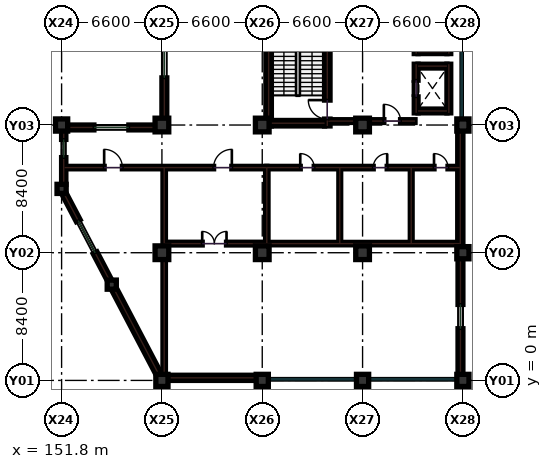
"""IFC4 building model, lengths in metres.
Left out: names, types, materials, properties, quantities, classifications, styles, units other than length and angle.
Written with IfcOpenShell. Run it as: python <this file> out.ifc"""

import sys

from ifc_helpers import new_model, si_unit, direction, frame, frame_2d, origin, origin_2d, place, context, subcontext, project, spatial, rectangle, extrude, element, fill, save


model = new_model("IFC4")
c1 = context("Model", 3, precision=1e-05, world=origin(), true_north=direction((0.0, 1.0)))
c2 = subcontext(c1, "Body", "Model", "MODEL_VIEW")
j1 = project(units=[si_unit("LENGTHUNIT", "METRE"), si_unit("PLANEANGLEUNIT", "RADIAN")], contexts=[c1])
p1 = place(None, origin())
s1 = spatial("IfcSite", under=j1, at=p1, CompositionType="ELEMENT")
p2 = place(p1, origin())
s2 = spatial("IfcBuilding", under=s1, at=p2, CompositionType="ELEMENT")
p3 = place(p2, frame((0.0, 0.0, 9.9)))
s3 = spatial("IfcBuildingStorey", under=s2, at=p3, CompositionType="ELEMENT", Elevation=9.9)
for number, where, z_axis, x_axis in (
    (1, (151.8, 16.8, 0.0), (0.0, 0.0, 1.0), (1.0, 0.0, 0.0)),
    (2, (158.4, 0.0, 0.0), (0.0, 0.0, 1.0), (1.0, 0.0, 0.0)),
):
    element("IfcColumn", number, at=place(p3, frame(where, z_axis=z_axis, x_axis=x_axis)), inside=s3, PredefinedType="COLUMN", context=c2, shape_type="SweptSolid", body=[
        extrude(rectangle(XDim=0.8, YDim=0.8, at=origin_2d()), origin(), (0.0, 0.0, 1.0), 4.5),
    ])
for number, where, z_axis, x_axis in (
    (3, (158.4, 8.4, 0.0), (0.0, 0.0, 1.0), (1.0, 0.0, 0.0)),
    (4, (158.4, 16.8, 0.0), (0.0, 0.0, 1.0), (1.0, 0.0, 0.0)),
):
    element("IfcColumn", number, at=place(p3, frame(where, z_axis=z_axis, x_axis=x_axis)), inside=s3, PredefinedType="COLUMN", context=c2, shape_type="SweptSolid", body=[
        extrude(rectangle(XDim=0.9, YDim=0.9, at=origin_2d()), origin(), (0.0, 0.0, 1.0), 4.5),
    ])
p4 = place(p3, frame((165.0, 0.0, 0.0), z_axis=(0.0, 0.0, 1.0), x_axis=(1.0, 0.0, 0.0)))
e5 = element("IfcColumn", 5, at=p4, inside=s3, PredefinedType="COLUMN", context=c2, shape_type="SweptSolid", body=[
    extrude(rectangle(XDim=0.8, YDim=0.8, at=origin_2d()), origin(), (0.0, 0.0, 1.0), 4.5),
])
for number, where, z_axis, x_axis in (
    (6, (165.0, 8.4, 0.0), (0.0, 0.0, 1.0), (1.0, 0.0, 0.0)),
    (7, (165.0, 16.8, 0.0), (0.0, 0.0, 1.0), (1.0, 0.0, 0.0)),
):
    element("IfcColumn", number, at=place(p3, frame(where, z_axis=z_axis, x_axis=x_axis)), inside=s3, PredefinedType="COLUMN", context=c2, shape_type="SweptSolid", body=[
        extrude(rectangle(XDim=0.9, YDim=0.9, at=origin_2d()), origin(), (0.0, 0.0, 1.0), 4.5),
    ])
p5 = place(p3, frame((171.6, 0.0, 0.0), z_axis=(0.0, 0.0, 1.0), x_axis=(1.0, 0.0, 0.0)))
e8 = element("IfcColumn", 8, at=p5, inside=s3, PredefinedType="COLUMN", context=c2, shape_type="SweptSolid", body=[
    extrude(rectangle(XDim=0.8, YDim=0.8, at=origin_2d()), origin(), (0.0, 0.0, 1.0), 4.5),
])
for number, where, z_axis, x_axis in (
    (9, (171.6, 8.4, 0.0), (0.0, 0.0, 1.0), (1.0, 0.0, 0.0)),
    (10, (171.6, 16.8, 0.0), (0.0, 0.0, 1.0), (1.0, 0.0, 0.0)),
):
    element("IfcColumn", number, at=place(p3, frame(where, z_axis=z_axis, x_axis=x_axis)), inside=s3, PredefinedType="COLUMN", context=c2, shape_type="SweptSolid", body=[
        extrude(rectangle(XDim=0.9, YDim=0.9, at=origin_2d()), origin(), (0.0, 0.0, 1.0), 4.5),
    ])
for number, where, z_axis, x_axis in (
    (11, (178.2, 0.0, 0.0), (0.0, 0.0, 1.0), (1.0, 0.0, 0.0)),
    (12, (178.2, 8.4, 0.0), (0.0, 0.0, 1.0), (1.0, 0.0, 0.0)),
    (13, (178.2, 16.8, 0.0), (0.0, 0.0, 1.0), (1.0, 0.0, 0.0)),
):
    element("IfcColumn", number, at=place(p3, frame(where, z_axis=z_axis, x_axis=x_axis)), inside=s3, PredefinedType="COLUMN", context=c2, shape_type="SweptSolid", body=[
        extrude(rectangle(XDim=0.8, YDim=0.8, at=origin_2d()), origin(), (0.0, 0.0, 1.0), 4.5),
    ])
for number, where, z_axis, x_axis in (
    (14, (151.8, 12.6, 0.0), (0.0, 0.0, 1.0), (1.0, 0.0, 0.0)),
    (15, (155.1, 6.3, 0.0), (0.0, 0.0, 1.0), (1.0, 0.0, 0.0)),
):
    element("IfcColumn", number, at=place(p3, frame(where, z_axis=z_axis, x_axis=x_axis)), inside=s3, PredefinedType="COLUMN", context=c2, shape_type="SweptSolid", body=[
        extrude(rectangle(XDim=0.6, YDim=0.6, at=origin_2d()), origin(), (0.0, 0.0, 1.0), 4.5),
    ])
p6 = place(p3, frame((165.3, 14.0, 0.0), z_axis=(0.0, 0.0, 1.0), x_axis=(1.0, 0.0, 0.0)))
e16 = element("IfcWall", 16, at=p6, inside=s3, PredefinedType="PARTITIONING", context=c2, shape_type="SweptSolid", body=[
    extrude(rectangle(XDim=12.7, YDim=0.16, at=frame_2d((6.35, 0.0))), origin(), (0.0, 0.0, 1.0), 3.49),
])
p7 = place(p6, frame((2.2, 0.0, 0.0)))
e17 = element("IfcOpeningElement", 17, at=p7, cuts=e16, PredefinedType="OPENING", context=c2, shape_type="SweptSolid", body=[
    extrude(rectangle(XDim=0.92, YDim=2.08, at=frame_2d((0.46, 1.04))), frame((0.0, 0.09, 0.0), z_axis=(0.0, -1.0, 0.0), x_axis=(1.0, 0.0, 0.0)), (0.0, 0.0, 1.0), 0.18),
])
p8 = place(p6, frame((7.0, 0.0, 0.0)))
e18 = element("IfcOpeningElement", 18, at=p8, cuts=e16, PredefinedType="OPENING", context=c2, shape_type="SweptSolid", body=[
    extrude(rectangle(XDim=0.92, YDim=2.08, at=frame_2d((0.46, 1.04))), frame((0.0, 0.09, 0.0), z_axis=(0.0, -1.0, 0.0), x_axis=(1.0, 0.0, 0.0)), (0.0, 0.0, 1.0), 0.18),
])
p9 = place(p6, frame((11.0, 0.0, 0.0)))
e19 = element("IfcOpeningElement", 19, at=p9, cuts=e16, PredefinedType="OPENING", context=c2, shape_type="SweptSolid", body=[
    extrude(rectangle(XDim=0.92, YDim=2.08, at=frame_2d((0.46, 1.04))), frame((0.0, 0.09, 0.0), z_axis=(0.0, -1.0, 0.0), x_axis=(1.0, 0.0, 0.0)), (0.0, 0.0, 1.0), 0.18),
])
p10 = place(p3, frame((165.3, 9.0, 0.0), z_axis=(0.0, 0.0, 1.0), x_axis=(1.0, 0.0, 0.0)))
e20 = element("IfcWall", 20, at=p10, inside=s3, PredefinedType="PARTITIONING", context=c2, shape_type="SweptSolid", body=[
    extrude(rectangle(XDim=12.7, YDim=0.16, at=frame_2d((6.35, 0.0))), origin(), (0.0, 0.0, 1.0), 3.49),
])
p11 = place(p3, frame((165.3, 9.0, 0.0), z_axis=(0.0, 0.0, 1.0), x_axis=(0.0, 1.0, 0.0)))
e21 = element("IfcWall", 21, at=p11, inside=s3, PredefinedType="PARTITIONING", context=c2, shape_type="SweptSolid", body=[
    extrude(rectangle(XDim=5.0, YDim=0.16, at=frame_2d((2.5, 0.0))), origin(), (0.0, 0.0, 1.0), 3.49),
])
for number, where, z_axis, x_axis in (
    (22, (170.1, 9.0, 0.0), (0.0, 0.0, 1.0), (0.0, 1.0, 0.0)),
    (23, (174.8, 9.0, 0.0), (0.0, 0.0, 1.0), (0.0, 1.0, 0.0)),
):
    element("IfcWall", number, at=place(p3, frame(where, z_axis=z_axis, x_axis=x_axis)), inside=s3, PredefinedType="PARTITIONING", context=c2, shape_type="SweptSolid", body=[
        extrude(rectangle(XDim=5.0, YDim=0.12, at=frame_2d((2.5, 0.0))), origin(), (0.0, 0.0, 1.0), 3.49),
    ])
p12 = place(p3, frame((158.55, 9.0, 0.0), z_axis=(0.0, 0.0, 1.0), x_axis=(1.0, 0.0, 0.0)))
e24 = element("IfcWall", 24, at=p12, inside=s3, PredefinedType="SOLIDWALL", context=c2, shape_type="SweptSolid", body=[
    extrude(rectangle(XDim=6.75, YDim=0.18, at=frame_2d((3.375, 0.0))), origin(), (0.0, 0.0, 1.0), 3.49),
])
p13 = place(p12, frame((2.5, 0.0, 0.0)))
e25 = element("IfcOpeningElement", 25, at=p13, cuts=e24, PredefinedType="OPENING", context=c2, shape_type="SweptSolid", body=[
    extrude(rectangle(XDim=1.6, YDim=2.2, at=frame_2d((0.8, 1.1))), frame((0.0, 0.1, 0.0), z_axis=(0.0, -1.0, 0.0), x_axis=(1.0, 0.0, 0.0)), (0.0, 0.0, 1.0), 0.2),
])
p14 = place(p3, frame((158.55, 0.25, 0.0), z_axis=(0.0, 0.0, 1.0), x_axis=(0.0, 1.0, 0.0)))
e26 = element("IfcWall", 26, at=p14, inside=s3, PredefinedType="PARTITIONING", context=c2, shape_type="SweptSolid", body=[
    extrude(rectangle(XDim=7.7, YDim=0.16, at=frame_2d((3.85, 0.0))), origin(), (0.0, 0.0, 1.0), 3.49),
])
p15 = place(p3, frame((158.55, 8.85, 0.0), z_axis=(0.0, 0.0, 1.0), x_axis=(0.0, 1.0, 0.0)))
e27 = element("IfcWall", 27, at=p15, inside=s3, PredefinedType="PARTITIONING", context=c2, shape_type="SweptSolid", body=[
    extrude(rectangle(XDim=5.15, YDim=0.16, at=frame_2d((2.575, 0.0))), origin(), (0.0, 0.0, 1.0), 3.49),
])
p16 = place(p3, frame((152.0, 14.0, 0.0), z_axis=(0.0, 0.0, 1.0), x_axis=(1.0, 0.0, 0.0)))
e28 = element("IfcWall", 28, at=p16, inside=s3, PredefinedType="PARTITIONING", context=c2, shape_type="SweptSolid", body=[
    extrude(rectangle(XDim=13.3, YDim=0.16, at=frame_2d((6.65, 0.0))), origin(), (0.0, 0.0, 1.0), 3.49),
])
p17 = place(p16, frame((2.6, 0.0, 0.0)))
e29 = element("IfcOpeningElement", 29, at=p17, cuts=e28, PredefinedType="OPENING", context=c2, shape_type="SweptSolid", body=[
    extrude(rectangle(XDim=1.2, YDim=2.22, at=frame_2d((0.6, 1.11))), frame((0.0, 0.09, 0.0), z_axis=(0.0, -1.0, 0.0), x_axis=(1.0, 0.0, 0.0)), (0.0, 0.0, 1.0), 0.18),
])
p18 = place(p16, frame((9.8, 0.0, 0.0)))
e30 = element("IfcOpeningElement", 30, at=p18, cuts=e28, PredefinedType="OPENING", context=c2, shape_type="SweptSolid", body=[
    extrude(rectangle(XDim=1.2, YDim=2.22, at=frame_2d((0.6, 1.11))), frame((0.0, 0.09, 0.0), z_axis=(0.0, -1.0, 0.0), x_axis=(1.0, 0.0, 0.0)), (0.0, 0.0, 1.0), 0.18),
])
p19 = place(p3, frame((157.955, 16.64, 0.0), z_axis=(0.0, 0.0, 1.0), x_axis=(-1.0, 0.0, 0.0)))
e31 = element("IfcWall", 31, at=p19, inside=s3, PredefinedType="SOLIDWALL", context=c2, shape_type="SweptSolid", body=[
    extrude(rectangle(XDim=5.76, YDim=0.32, at=frame_2d((2.88, 0.0))), origin(), (0.0, 0.0, 1.0), 3.625),
])
p20 = place(p19, frame((1.73, 0.0, 0.95)))
e32 = element("IfcOpeningElement", 32, at=p20, cuts=e31, PredefinedType="OPENING", context=c2, shape_type="SweptSolid", body=[
    extrude(rectangle(XDim=2.3, YDim=1.95, at=frame_2d((1.15, 0.975))), frame((0.0, 0.17, 0.0), z_axis=(0.0, -1.0, 0.0), x_axis=(1.0, 0.0, 0.0)), (0.0, 0.0, 1.0), 0.34),
])
p21 = place(p3, frame((158.795, 0.17, 0.0), z_axis=(0.0, 0.0, 1.0), x_axis=(1.0, 0.0, 0.0)))
e33 = element("IfcWall", 33, at=p21, inside=s3, PredefinedType="SHEAR", context=c2, shape_type="SweptSolid", body=[
    extrude(rectangle(XDim=5.81, YDim=0.34, at=frame_2d((2.905, 0.0))), origin(), (0.0, 0.0, 1.0), 4.24),
])
p22 = place(p3, frame((158.56, 24.755, 0.0), z_axis=(0.0, 0.0, 1.0), x_axis=(0.0, -1.0, 0.0)))
e34 = element("IfcWall", 34, at=p22, inside=s3, PredefinedType="SOLIDWALL", context=c2, shape_type="SweptSolid", body=[
    extrude(rectangle(XDim=7.51, YDim=0.32, at=frame_2d((3.755, 0.0))), origin(), (0.0, 0.0, 1.0), 3.625),
])
p23 = place(p22, frame((2.655, 0.0, 0.95)))
e35 = element("IfcOpeningElement", 35, at=p23, cuts=e34, PredefinedType="OPENING", context=c2, shape_type="SweptSolid", body=[
    extrude(rectangle(XDim=2.2, YDim=1.85, at=frame_2d((1.1, 0.925))), frame((0.0, 0.17, 0.0), z_axis=(0.0, -1.0, 0.0), x_axis=(1.0, 0.0, 0.0)), (0.0, 0.0, 1.0), 0.34),
])
p24 = place(p3, frame((178.04, 0.395, 0.0), z_axis=(0.0, 0.0, 1.0), x_axis=(0.0, 1.0, 0.0)))
e36 = element("IfcWall", 36, at=p24, inside=s3, PredefinedType="SOLIDWALL", context=c2, shape_type="SweptSolid", body=[
    extrude(rectangle(XDim=7.61, YDim=0.32, at=frame_2d((3.805, 0.0))), origin(), (0.0, 0.0, 1.0), 3.625),
])
p25 = place(p24, frame((3.005, 0.0, 0.95)))
e37 = element("IfcOpeningElement", 37, at=p25, cuts=e36, PredefinedType="OPENING", context=c2, shape_type="SweptSolid", body=[
    extrude(rectangle(XDim=1.6, YDim=1.85, at=frame_2d((0.8, 0.925))), frame((0.0, 0.17, 0.0), z_axis=(0.0, -1.0, 0.0), x_axis=(1.0, 0.0, 0.0)), (0.0, 0.0, 1.0), 0.34),
])
p26 = place(p3, frame((178.03, 8.795, 0.0), z_axis=(0.0, 0.0, 1.0), x_axis=(0.0, 1.0, 0.0)))
e38 = element("IfcWall", 38, at=p26, inside=s3, PredefinedType="SHEAR", context=c2, shape_type="SweptSolid", body=[
    extrude(rectangle(XDim=7.61, YDim=0.34, at=frame_2d((3.805, 0.0))), origin(), (0.0, 0.0, 1.0), 4.24),
])
p27 = place(p3, frame((151.94, 16.405, 0.0), z_axis=(0.0, 0.0, 1.0), x_axis=(0.0, -1.0, 0.0)))
e39 = element("IfcWall", 39, at=p27, inside=s3, PredefinedType="SOLIDWALL", context=c2, shape_type="SweptSolid", body=[
    extrude(rectangle(XDim=3.51, YDim=0.28, at=frame_2d((1.755, 0.0))), origin(), (0.0, 0.0, 1.0), 3.625),
])
p28 = place(p27, frame((0.55, 0.0, 0.95)))
e40 = element("IfcOpeningElement", 40, at=p28, cuts=e39, PredefinedType="OPENING", context=c2, shape_type="SweptSolid", body=[
    extrude(rectangle(XDim=1.2, YDim=1.5, at=frame_2d((0.6, 0.75))), frame((0.0, 0.15, 0.0), z_axis=(0.0, -1.0, 0.0), x_axis=(1.0, 0.0, 0.0)), (0.0, 0.0, 1.0), 0.3),
])
p29 = place(p3, frame((151.95, 12.31, 0.0), z_axis=(0.0, 0.0, 1.0), x_axis=(0.464471613901, -0.885588007981, 0.0)))
e41 = element("IfcWall", 41, at=p29, inside=s3, PredefinedType="SOLIDWALL", context=c2, shape_type="SweptSolid", body=[
    extrude(rectangle(XDim=6.459, YDim=0.28, at=frame_2d((3.229, 0.0))), origin(), (0.0, 0.0, 1.0), 3.625),
])
p30 = place(p29, frame((2.03, 0.0, 0.95)))
e42 = element("IfcOpeningElement", 42, at=p30, cuts=e41, PredefinedType="OPENING", context=c2, shape_type="SweptSolid", body=[
    extrude(rectangle(XDim=2.4, YDim=1.6, at=frame_2d((1.2, 0.8))), frame((0.0, 0.15, 0.0), z_axis=(0.0, -1.0, 0.0), x_axis=(1.0, 0.0, 0.0)), (0.0, 0.0, 1.0), 0.3),
])
p31 = place(p3, frame((155.25, 6.01, 0.0), z_axis=(0.0, 0.0, 1.0), x_axis=(0.464471613901, -0.885588007981, 0.0)))
e43 = element("IfcWall", 43, at=p31, inside=s3, PredefinedType="SHEAR", context=c2, shape_type="SweptSolid", body=[
    extrude(rectangle(XDim=6.459, YDim=0.34, at=frame_2d((3.229, 0.0))), origin(), (0.0, 0.0, 1.0), 4.24),
])
p32 = place(p3, frame((165.42, 16.74, 0.0), z_axis=(0.0, 0.0, 1.0), x_axis=(0.0, 1.0, 0.0)))
e44 = element("IfcWall", 44, at=p32, inside=s3, PredefinedType="SHEAR", context=c2, shape_type="SweptSolid", body=[
    extrude(rectangle(XDim=8.37, YDim=0.36, at=frame_2d((4.185, 0.0))), origin(), (0.0, 0.0, 1.0), 4.24),
])
p33 = place(p3, frame((169.28, 16.74, 0.0), z_axis=(0.0, 0.0, 1.0), x_axis=(0.0, 1.0, 0.0)))
e45 = element("IfcWall", 45, at=p33, inside=s3, PredefinedType="SHEAR", context=c2, shape_type="SweptSolid", body=[
    extrude(rectangle(XDim=8.37, YDim=0.36, at=frame_2d((4.185, 0.0))), origin(), (0.0, 0.0, 1.0), 4.24),
])
p34 = place(p33, frame((0.45, 0.0, 0.0)))
e46 = element("IfcOpeningElement", 46, at=p34, cuts=e45, PredefinedType="OPENING", context=c2, shape_type="SweptSolid", body=[
    extrude(rectangle(XDim=1.25, YDim=2.15, at=frame_2d((0.625, 1.075))), frame((0.0, 0.19, 0.0), z_axis=(0.0, -1.0, 0.0), x_axis=(1.0, 0.0, 0.0)), (0.0, 0.0, 1.0), 0.38),
])
p35 = place(p3, frame((165.6, 16.92, 0.0), z_axis=(0.0, 0.0, 1.0), x_axis=(1.0, 0.0, 0.0)))
e47 = element("IfcWall", 47, at=p35, inside=s3, PredefinedType="SHEAR", context=c2, shape_type="SweptSolid", body=[
    extrude(rectangle(XDim=3.5, YDim=0.36, at=frame_2d((1.75, 0.0))), origin(), (0.0, 0.0, 1.0), 4.24),
])
p36 = place(p3, frame((175.125, 17.6, 0.0), z_axis=(0.0, 0.0, 1.0), x_axis=(0.0, 1.0, 0.0)))
e48 = element("IfcWall", 48, at=p36, inside=s3, PredefinedType="SHEAR", context=c2, shape_type="SweptSolid", body=[
    extrude(rectangle(XDim=3.2, YDim=0.25, at=frame_2d((1.6, 0.0))), origin(), (0.0, 0.0, 1.0), 4.24),
])
p37 = place(p36, frame((1.05, 0.0, 0.0)))
e49 = element("IfcOpeningElement", 49, at=p37, cuts=e48, PredefinedType="OPENING", context=c2, shape_type="SweptSolid", body=[
    extrude(rectangle(XDim=1.1, YDim=2.15, at=frame_2d((0.55, 1.075))), frame((0.0, 0.135, 0.0), z_axis=(0.0, -1.0, 0.0), x_axis=(1.0, 0.0, 0.0)), (0.0, 0.0, 1.0), 0.27),
])
p38 = place(p3, frame((177.275, 17.6, 0.0), z_axis=(0.0, 0.0, 1.0), x_axis=(0.0, 1.0, 0.0)))
e50 = element("IfcWall", 50, at=p38, inside=s3, PredefinedType="SHEAR", context=c2, shape_type="SweptSolid", body=[
    extrude(rectangle(XDim=3.2, YDim=0.25, at=frame_2d((1.6, 0.0))), origin(), (0.0, 0.0, 1.0), 4.24),
])
for number, where, z_axis, x_axis in (
    (51, (175.25, 17.725, 0.0), (0.0, 0.0, 1.0), (1.0, 0.0, 0.0)),
    (52, (175.25, 20.675, 0.0), (0.0, 0.0, 1.0), (1.0, 0.0, 0.0)),
):
    element("IfcWall", number, at=place(p3, frame(where, z_axis=z_axis, x_axis=x_axis)), inside=s3, PredefinedType="SHEAR", context=c2, shape_type="SweptSolid", body=[
        extrude(rectangle(XDim=1.9, YDim=0.25, at=frame_2d((0.95, 0.0))), origin(), (0.0, 0.0, 1.0), 4.24),
    ])
p39 = place(p3, frame((175.125, 21.5, 0.0), z_axis=(0.0, 0.0, 1.0), x_axis=(0.0, 1.0, 0.0)))
e53 = element("IfcWall", 53, at=p39, inside=s3, PredefinedType="SHEAR", context=c2, shape_type="SweptSolid", body=[
    extrude(rectangle(XDim=3.2, YDim=0.25, at=frame_2d((1.6, 0.0))), origin(), (0.0, 0.0, 1.0), 4.24),
])
p40 = place(p39, frame((1.05, 0.0, 0.0)))
e54 = element("IfcOpeningElement", 54, at=p40, cuts=e53, PredefinedType="OPENING", context=c2, shape_type="SweptSolid", body=[
    extrude(rectangle(XDim=1.1, YDim=2.15, at=frame_2d((0.55, 1.075))), frame((0.0, 0.135, 0.0), z_axis=(0.0, -1.0, 0.0), x_axis=(1.0, 0.0, 0.0)), (0.0, 0.0, 1.0), 0.27),
])
p41 = place(p3, frame((177.275, 21.5, 0.0), z_axis=(0.0, 0.0, 1.0), x_axis=(0.0, 1.0, 0.0)))
e55 = element("IfcWall", 55, at=p41, inside=s3, PredefinedType="SHEAR", context=c2, shape_type="SweptSolid", body=[
    extrude(rectangle(XDim=3.2, YDim=0.25, at=frame_2d((1.6, 0.0))), origin(), (0.0, 0.0, 1.0), 4.24),
])
p42 = place(p3, frame((175.25, 21.625, 0.0), z_axis=(0.0, 0.0, 1.0), x_axis=(1.0, 0.0, 0.0)))
e56 = element("IfcWall", 56, at=p42, inside=s3, PredefinedType="SHEAR", context=c2, shape_type="SweptSolid", body=[
    extrude(rectangle(XDim=1.9, YDim=0.25, at=frame_2d((0.95, 0.0))), origin(), (0.0, 0.0, 1.0), 4.24),
])
p43 = place(p3, frame((169.35, 17.06, 0.0), z_axis=(0.0, 0.0, 1.0), x_axis=(1.0, 0.0, 0.0)))
e57 = element("IfcWall", 57, at=p43, inside=s3, PredefinedType="SOLIDWALL", context=c2, shape_type="SweptSolid", body=[
    extrude(rectangle(XDim=5.7, YDim=0.18, at=frame_2d((2.85, 0.0))), origin(), (0.0, 0.0, 1.0), 3.575),
])
p44 = place(p43, frame((3.65, 0.0, 0.0)))
e58 = element("IfcOpeningElement", 58, at=p44, cuts=e57, PredefinedType="OPENING", context=c2, shape_type="SweptSolid", body=[
    extrude(rectangle(XDim=1.1, YDim=2.15, at=frame_2d((0.55, 1.075))), frame((0.0, 0.1, 0.0), z_axis=(0.0, -1.0, 0.0), x_axis=(1.0, 0.0, 0.0)), (0.0, 0.0, 1.0), 0.2),
])
p45 = place(p7, origin())
e59 = element("IfcDoor", 59, at=p45, inside=s3, OperationType="SINGLE_SWING_LEFT", PredefinedType="DOOR", context=c2, shape_type="SweptSolid", body=[
    extrude(rectangle(XDim=0.92, YDim=2.08, at=frame_2d((0.46, 1.04))), frame((0.0, 0.025, 0.0), z_axis=(0.0, -1.0, 0.0), x_axis=(1.0, 0.0, 0.0)), (0.0, 0.0, 1.0), 0.05),
])
fill(e17, e59)
p46 = place(p8, origin())
e60 = element("IfcDoor", 60, at=p46, inside=s3, OperationType="SINGLE_SWING_RIGHT", PredefinedType="DOOR", context=c2, shape_type="SweptSolid", body=[
    extrude(rectangle(XDim=0.92, YDim=2.08, at=frame_2d((0.46, 1.04))), frame((0.0, 0.025, 0.0), z_axis=(0.0, -1.0, 0.0), x_axis=(1.0, 0.0, 0.0)), (0.0, 0.0, 1.0), 0.05),
])
fill(e18, e60)
p47 = place(p9, origin())
e61 = element("IfcDoor", 61, at=p47, inside=s3, OperationType="SINGLE_SWING_LEFT", PredefinedType="DOOR", context=c2, shape_type="SweptSolid", body=[
    extrude(rectangle(XDim=0.92, YDim=2.08, at=frame_2d((0.46, 1.04))), frame((0.0, 0.025, 0.0), z_axis=(0.0, -1.0, 0.0), x_axis=(1.0, 0.0, 0.0)), (0.0, 0.0, 1.0), 0.05),
])
fill(e19, e61)
p48 = place(p13, origin())
e62 = element("IfcDoor", 62, at=p48, inside=s3, OperationType="DOUBLE_DOOR_SINGLE_SWING", PredefinedType="DOOR", context=c2, shape_type="SweptSolid", body=[
    extrude(rectangle(XDim=1.6, YDim=2.2, at=frame_2d((0.8, 1.1))), frame((0.0, 0.025, 0.0), z_axis=(0.0, -1.0, 0.0), x_axis=(1.0, 0.0, 0.0)), (0.0, 0.0, 1.0), 0.05),
])
fill(e25, e62)
p49 = place(p17, origin())
e63 = element("IfcDoor", 63, at=p49, inside=s3, OperationType="SINGLE_SWING_LEFT", PredefinedType="DOOR", context=c2, shape_type="SweptSolid", body=[
    extrude(rectangle(XDim=1.2, YDim=2.22, at=frame_2d((0.6, 1.11))), frame((0.0, 0.025, 0.0), z_axis=(0.0, -1.0, 0.0), x_axis=(1.0, 0.0, 0.0)), (0.0, 0.0, 1.0), 0.05),
])
fill(e29, e63)
p50 = place(p18, origin())
e64 = element("IfcDoor", 64, at=p50, inside=s3, OperationType="SINGLE_SWING_RIGHT", PredefinedType="DOOR", context=c2, shape_type="SweptSolid", body=[
    extrude(rectangle(XDim=1.2, YDim=2.22, at=frame_2d((0.6, 1.11))), frame((0.0, 0.025, 0.0), z_axis=(0.0, -1.0, 0.0), x_axis=(1.0, 0.0, 0.0)), (0.0, 0.0, 1.0), 0.05),
])
fill(e30, e64)
p51 = place(p20, origin())
e65 = element("IfcWindow", 65, at=p51, inside=s3, PartitioningType="SINGLE_PANEL", PredefinedType="WINDOW", context=c2, shape_type="SweptSolid", body=[
    extrude(rectangle(XDim=2.3, YDim=1.95, at=frame_2d((1.15, 0.975))), frame((0.0, 0.03, 0.0), z_axis=(0.0, -1.0, 0.0), x_axis=(1.0, 0.0, 0.0)), (0.0, 0.0, 1.0), 0.06),
])
fill(e32, e65)
p52 = place(p23, origin())
e66 = element("IfcWindow", 66, at=p52, inside=s3, PartitioningType="SINGLE_PANEL", PredefinedType="WINDOW", context=c2, shape_type="SweptSolid", body=[
    extrude(rectangle(XDim=2.2, YDim=1.85, at=frame_2d((1.1, 0.925))), frame((0.0, 0.03, 0.0), z_axis=(0.0, -1.0, 0.0), x_axis=(1.0, 0.0, 0.0)), (0.0, 0.0, 1.0), 0.06),
])
fill(e35, e66)
p53 = place(p25, origin())
e67 = element("IfcWindow", 67, at=p53, inside=s3, PartitioningType="SINGLE_PANEL", PredefinedType="WINDOW", context=c2, shape_type="SweptSolid", body=[
    extrude(rectangle(XDim=1.6, YDim=1.85, at=frame_2d((0.8, 0.925))), frame((0.0, 0.03, 0.0), z_axis=(0.0, -1.0, 0.0), x_axis=(1.0, 0.0, 0.0)), (0.0, 0.0, 1.0), 0.06),
])
fill(e37, e67)
p54 = place(p28, origin())
e68 = element("IfcWindow", 68, at=p54, inside=s3, PartitioningType="SINGLE_PANEL", PredefinedType="WINDOW", context=c2, shape_type="SweptSolid", body=[
    extrude(rectangle(XDim=1.2, YDim=1.5, at=frame_2d((0.6, 0.75))), frame((0.0, 0.03, 0.0), z_axis=(0.0, -1.0, 0.0), x_axis=(1.0, 0.0, 0.0)), (0.0, 0.0, 1.0), 0.06),
])
fill(e40, e68)
p55 = place(p30, origin())
e69 = element("IfcWindow", 69, at=p55, inside=s3, PartitioningType="SINGLE_PANEL", PredefinedType="WINDOW", context=c2, shape_type="SweptSolid", body=[
    extrude(rectangle(XDim=2.4, YDim=1.6, at=frame_2d((1.2, 0.8))), frame((0.0, 0.03, 0.0), z_axis=(0.0, -1.0, 0.0), x_axis=(1.0, 0.0, 0.0)), (0.0, 0.0, 1.0), 0.06),
])
fill(e42, e69)
p56 = place(p34, origin())
e70 = element("IfcDoor", 70, at=p56, inside=s3, OperationType="SINGLE_SWING_RIGHT", PredefinedType="DOOR", context=c2, shape_type="SweptSolid", body=[
    extrude(rectangle(XDim=1.25, YDim=2.15, at=frame_2d((0.625, 1.075))), frame((0.0, 0.025, 0.0), z_axis=(0.0, -1.0, 0.0), x_axis=(1.0, 0.0, 0.0)), (0.0, 0.0, 1.0), 0.05),
])
fill(e46, e70)
p57 = place(p37, origin())
e71 = element("IfcDoor", 71, at=p57, inside=s3, OperationType="SLIDING_TO_LEFT", PredefinedType="DOOR", context=c2, shape_type="SweptSolid", body=[
    extrude(rectangle(XDim=1.1, YDim=2.15, at=frame_2d((0.55, 1.075))), frame((0.0, 0.025, 0.0), z_axis=(0.0, -1.0, 0.0), x_axis=(1.0, 0.0, 0.0)), (0.0, 0.0, 1.0), 0.05),
])
fill(e49, e71)
p58 = place(p44, origin())
e72 = element("IfcDoor", 72, at=p58, inside=s3, OperationType="SINGLE_SWING_LEFT", PredefinedType="DOOR", context=c2, shape_type="SweptSolid", body=[
    extrude(rectangle(XDim=1.1, YDim=2.15, at=frame_2d((0.55, 1.075))), frame((0.0, 0.025, 0.0), z_axis=(0.0, -1.0, 0.0), x_axis=(1.0, 0.0, 0.0)), (0.0, 0.0, 1.0), 0.05),
])
fill(e58, e72)
save(model, sys.argv[1])
